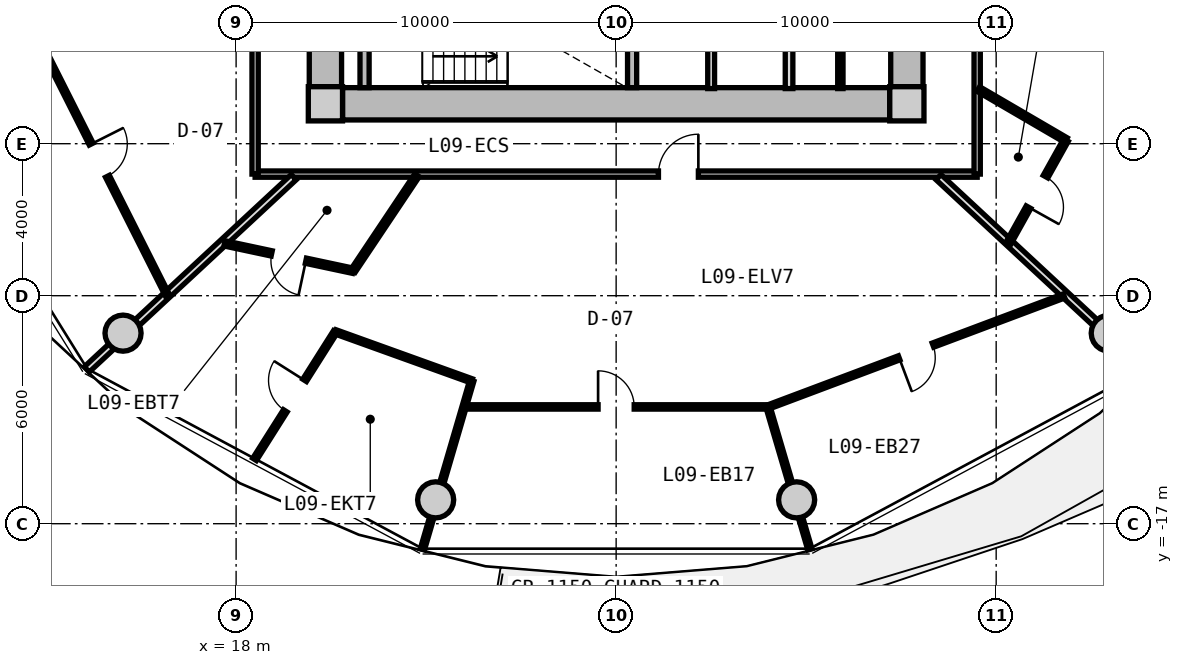
"""IFC4 building model, lengths in metres.
Left out: names, types, materials, properties, quantities, classifications, styles, units other than length and angle.
Written with IfcOpenShell. Run it as: python <this file> out.ifc"""

import sys

from ifc_helpers import new_model, si_unit, direction, frame, frame_2d, origin, origin_2d, place, context, subcontext, project, spatial, rectangle, circle, extrude, source, transform, mapped, element, fill, save


model = new_model("IFC4")
c1 = context("Model", 3, precision=1e-05, world=origin(), true_north=direction((0.0, 1.0)))
c2 = subcontext(c1, "Body", "Model", "MODEL_VIEW")
j1 = project(units=[si_unit("LENGTHUNIT", "METRE"), si_unit("PLANEANGLEUNIT", "RADIAN")], contexts=[c1])
p1 = place(None, origin())
s1 = spatial("IfcSite", under=j1, at=p1, CompositionType="ELEMENT")
p2 = place(p1, origin())
s2 = spatial("IfcBuilding", under=s1, at=p2, CompositionType="ELEMENT")
p3 = place(p2, frame((0.0, 0.0, 33.8)))
s3 = spatial("IfcBuildingStorey", under=s2, at=p3, CompositionType="ELEMENT", Elevation=33.8)
m1 = source(origin(), c2, "Body", "SweptSolid", [
    extrude(rectangle(XDim=0.9, YDim=0.9, at=origin_2d()), origin(), (0.0, 0.0, 1.0), 3.05),
])
for number, where, z_axis, x_axis in (
    (1, (20.35, -5.95, 0.0), (0.0, 0.0, 1.0), (1.0, 0.0, 0.0)),
    (2, (35.65, -5.95, 0.0), (0.0, 0.0, 1.0), (1.0, 0.0, 0.0)),
):
    element("IfcColumn", number, at=place(p3, frame(where, z_axis=z_axis, x_axis=x_axis)), inside=s3, PredefinedType="COLUMN", context=c2, shape_type="MappedRepresentation", body=[
        mapped(m1, transform((0.0, 0.0, 0.0), x_axis=(1.0, 0.0, 0.0), y_axis=(0.0, 1.0, 0.0), z_axis=(0.0, 0.0, 1.0), scale=1.0)),
    ])
m2 = source(origin(), c2, "Body", "SweptSolid", [
    extrude(rectangle(XDim=14.4, YDim=0.85, at=frame_2d((7.2, 0.0))), origin(), (0.0, 0.0, 1.0), 2.79),
])
p4 = place(p3, frame((35.2, -5.95, 0.0), z_axis=(0.0, 0.0, 1.0), x_axis=(-1.0, 0.0, 0.0)))
e3 = element("IfcWall", 3, at=p4, inside=s3, PredefinedType="SHEAR", context=c2, shape_type="MappedRepresentation", body=[
    mapped(m2, transform((0.0, 0.0, 0.0), x_axis=(1.0, 0.0, 0.0), y_axis=(0.0, 1.0, 0.0), z_axis=(0.0, 0.0, 1.0), scale=1.0)),
])
m3 = source(origin(), c2, "Body", "SweptSolid", [
    extrude(rectangle(XDim=11.0, YDim=0.85, at=frame_2d((5.5, 0.0))), origin(), (0.0, 0.0, 1.0), 2.79),
])
p5 = place(p3, frame((20.35, -5.5, 0.0), z_axis=(0.0, 0.0, 1.0), x_axis=(0.0, 1.0, 0.0)))
e4 = element("IfcWall", 4, at=p5, inside=s3, PredefinedType="SHEAR", context=c2, shape_type="MappedRepresentation", body=[
    mapped(m3, transform((0.0, 0.0, 0.0), x_axis=(1.0, 0.0, 0.0), y_axis=(0.0, 1.0, 0.0), z_axis=(0.0, 0.0, 1.0), scale=1.0)),
])
p6 = place(p5, frame((3.8, 0.0, 0.0)))
e5 = element("IfcOpeningElement", 5, at=p6, cuts=e4, PredefinedType="OPENING", context=c2, shape_type="SweptSolid", body=[
    extrude(rectangle(XDim=1.2, YDim=2.15, at=frame_2d((0.6, 1.075))), frame((0.0, 0.435, 0.0), z_axis=(0.0, -1.0, 0.0), x_axis=(1.0, 0.0, 0.0)), (0.0, 0.0, 1.0), 0.87),
])
p7 = place(p3, frame((35.65, 5.5, 0.0), z_axis=(0.0, 0.0, 1.0), x_axis=(0.0, -1.0, 0.0)))
e6 = element("IfcWall", 6, at=p7, inside=s3, PredefinedType="SHEAR", context=c2, shape_type="MappedRepresentation", body=[
    mapped(m3, transform((0.0, 0.0, 0.0), x_axis=(1.0, 0.0, 0.0), y_axis=(0.0, 1.0, 0.0), z_axis=(0.0, 0.0, 1.0), scale=1.0)),
])
p8 = place(p7, frame((5.65, 0.0, 0.0)))
e7 = element("IfcOpeningElement", 7, at=p8, cuts=e6, PredefinedType="OPENING", context=c2, shape_type="SweptSolid", body=[
    extrude(rectangle(XDim=1.2, YDim=2.15, at=frame_2d((0.6, 1.075))), frame((0.0, 0.435, 0.0), z_axis=(0.0, -1.0, 0.0), x_axis=(1.0, 0.0, 0.0)), (0.0, 0.0, 1.0), 0.87),
])
m4 = source(origin(), c2, "Body", "SweptSolid", [
    extrude(circle(Radius=0.475, at=origin_2d()), origin(), (0.0, 0.0, 1.0), 3.05),
])
for number, where, z_axis, x_axis in (
    (8, (15.025, -11.985, 0.0), (0.0, 0.0, 1.0), (1.0, 0.0, 0.0)),
    (9, (23.251, -16.373, 0.0), (0.0, 0.0, 1.0), (1.0, 0.0, 0.0)),
    (10, (32.749, -16.373, 0.0), (0.0, 0.0, 1.0), (1.0, 0.0, 0.0)),
    (11, (40.975, -11.985, 0.0), (0.0, 0.0, 1.0), (1.0, 0.0, 0.0)),
):
    element("IfcColumn", number, at=place(p3, frame(where, z_axis=z_axis, x_axis=x_axis)), inside=s3, PredefinedType="COLUMN", context=c2, shape_type="MappedRepresentation", body=[
        mapped(m4, transform((0.0, 0.0, 0.0), x_axis=(1.0, 0.0, 0.0), y_axis=(0.0, 1.0, 0.0), z_axis=(0.0, 0.0, 1.0), scale=1.0)),
    ])
m5 = source(origin(), c2, "Body", "SweptSolid", [
    extrude(rectangle(XDim=3.075, YDim=0.24, at=frame_2d((1.538, 0.0))), origin(), (0.0, 0.0, 1.0), 2.79),
])
for number, where, z_axis, x_axis in (
    (12, (21.38, -5.525, 0.0), (0.0, 0.0, 1.0), (0.0, 1.0, 0.0)),
    (13, (28.42, -5.525, 0.0), (0.0, 0.0, 1.0), (0.0, 1.0, 0.0)),
):
    element("IfcWall", number, at=place(p3, frame(where, z_axis=z_axis, x_axis=x_axis)), inside=s3, PredefinedType="PARTITIONING", context=c2, shape_type="MappedRepresentation", body=[
        mapped(m5, transform((0.0, 0.0, 0.0), x_axis=(1.0, 0.0, 0.0), y_axis=(0.0, 1.0, 0.0), z_axis=(0.0, 0.0, 1.0), scale=1.0)),
    ])
m6 = source(origin(), c2, "Body", "SweptSolid", [
    extrude(rectangle(XDim=3.8, YDim=0.2, at=frame_2d((1.9, 0.0))), origin(), (0.0, 0.0, 1.0), 2.775),
])
p9 = place(p3, frame((32.55, -5.55, 0.0), z_axis=(0.0, 0.0, 1.0), x_axis=(0.0, 1.0, 0.0)))
e14 = element("IfcWall", 14, at=p9, inside=s3, PredefinedType="PARTITIONING", context=c2, shape_type="MappedRepresentation", body=[
    mapped(m6, transform((0.0, 0.0, 0.0), x_axis=(1.0, 0.0, 0.0), y_axis=(0.0, 1.0, 0.0), z_axis=(0.0, 0.0, 1.0), scale=1.0)),
])
m7 = source(origin(), c2, "Body", "SweptSolid", [
    extrude(rectangle(XDim=3.22, YDim=0.18, at=frame_2d((1.61, 0.0))), origin(), (0.0, 0.0, 1.0), 2.775),
])
p10 = place(p3, frame((30.5, -5.55, 0.0), z_axis=(0.0, 0.0, 1.0), x_axis=(0.0, 1.0, 0.0)))
e15 = element("IfcWall", 15, at=p10, inside=s3, PredefinedType="PARTITIONING", context=c2, shape_type="MappedRepresentation", body=[
    mapped(m7, transform((0.0, 0.0, 0.0), x_axis=(1.0, 0.0, 0.0), y_axis=(0.0, 1.0, 0.0), z_axis=(0.0, 0.0, 1.0), scale=1.0)),
])
m8 = source(origin(), c2, "Body", "SweptSolid", [
    extrude(rectangle(XDim=3.8, YDim=0.14, at=frame_2d((1.9, 0.0))), origin(), (0.0, 0.0, 1.0), 2.775),
])
p11 = place(p3, frame((33.9, -5.55, 0.0), z_axis=(0.0, 0.0, 1.0), x_axis=(0.0, 1.0, 0.0)))
e16 = element("IfcWall", 16, at=p11, inside=s3, PredefinedType="PARTITIONING", context=c2, shape_type="MappedRepresentation", body=[
    mapped(m8, transform((0.0, 0.0, 0.0), x_axis=(1.0, 0.0, 0.0), y_axis=(0.0, 1.0, 0.0), z_axis=(0.0, 0.0, 1.0), scale=1.0)),
])
m9 = source(origin(), c2, "Body", "SweptSolid", [
    extrude(rectangle(XDim=19.0, YDim=0.165, at=frame_2d((9.5, 0.0))), origin(), (0.0, 0.0, 1.0), 2.775),
])
p12 = place(p3, frame((37.5, -7.8, 0.0), z_axis=(0.0, 0.0, 1.0), x_axis=(-1.0, 0.0, 0.0)))
e17 = element("IfcWall", 17, at=p12, inside=s3, PredefinedType="PARTITIONING", context=c2, shape_type="MappedRepresentation", body=[
    mapped(m9, transform((0.0, 0.0, 0.0), x_axis=(1.0, 0.0, 0.0), y_axis=(0.0, 1.0, 0.0), z_axis=(0.0, 0.0, 1.0), scale=1.0)),
])
p13 = place(p12, frame((7.336, 0.0, 0.0)))
e18 = element("IfcOpeningElement", 18, at=p13, cuts=e17, PredefinedType="OPENING", context=c2, shape_type="SweptSolid", body=[
    extrude(rectangle(XDim=1.05, YDim=2.15, at=frame_2d((0.525, 1.075))), frame((0.0, 0.093, 0.0), z_axis=(0.0, -1.0, 0.0), x_axis=(1.0, 0.0, 0.0)), (0.0, 0.0, 1.0), 0.185),
])
m10 = source(origin(), c2, "Body", "SweptSolid", [
    extrude(rectangle(XDim=15.6, YDim=0.165, at=frame_2d((7.8, 0.0))), origin(), (0.0, 0.0, 1.0), 2.775),
])
p14 = place(p3, frame((18.5, -7.8, 0.0), z_axis=(0.0, 0.0, 1.0), x_axis=(0.0, 1.0, 0.0)))
e19 = element("IfcWall", 19, at=p14, inside=s3, PredefinedType="PARTITIONING", context=c2, shape_type="MappedRepresentation", body=[
    mapped(m10, transform((0.0, 0.0, 0.0), x_axis=(1.0, 0.0, 0.0), y_axis=(0.0, 1.0, 0.0), z_axis=(0.0, 0.0, 1.0), scale=1.0)),
])
p15 = place(p14, frame((12.141, 0.0, 0.0)))
e20 = element("IfcOpeningElement", 20, at=p15, cuts=e19, PredefinedType="OPENING", context=c2, shape_type="SweptSolid", body=[
    extrude(rectangle(XDim=1.25, YDim=2.2, at=frame_2d((0.625, 1.1))), frame((0.0, 0.093, 0.0), z_axis=(0.0, -1.0, 0.0), x_axis=(1.0, 0.0, 0.0)), (0.0, 0.0, 1.0), 0.185),
])
p16 = place(p14, frame((3.63, 0.0, 0.0)))
e21 = element("IfcOpeningElement", 21, at=p16, cuts=e19, PredefinedType="OPENING", context=c2, shape_type="SweptSolid", body=[
    extrude(rectangle(XDim=1.05, YDim=2.15, at=frame_2d((0.525, 1.075))), frame((0.0, 0.093, 0.0), z_axis=(0.0, -1.0, 0.0), x_axis=(1.0, 0.0, 0.0)), (0.0, 0.0, 1.0), 0.185),
])
p17 = place(p3, frame((37.5, 7.8, 0.0), z_axis=(0.0, 0.0, 1.0), x_axis=(0.0, -1.0, 0.0)))
e22 = element("IfcWall", 22, at=p17, inside=s3, PredefinedType="PARTITIONING", context=c2, shape_type="MappedRepresentation", body=[
    mapped(m10, transform((0.0, 0.0, 0.0), x_axis=(1.0, 0.0, 0.0), y_axis=(0.0, 1.0, 0.0), z_axis=(0.0, 0.0, 1.0), scale=1.0)),
])
p18 = place(p17, frame((6.269, 0.0, 0.0)))
e23 = element("IfcOpeningElement", 23, at=p18, cuts=e22, PredefinedType="OPENING", context=c2, shape_type="SweptSolid", body=[
    extrude(rectangle(XDim=1.05, YDim=2.15, at=frame_2d((0.525, 1.075))), frame((0.0, 0.093, 0.0), z_axis=(0.0, -1.0, 0.0), x_axis=(1.0, 0.0, 0.0)), (0.0, 0.0, 1.0), 0.185),
])
m11 = source(origin(), c2, "Body", "SweptSolid", [
    extrude(rectangle(XDim=7.435, YDim=0.19, at=frame_2d((3.717, 0.0))), origin(), (0.0, 0.0, 1.0), 2.225),
])
p19 = place(p3, frame((19.517, -7.88, 0.0), z_axis=(0.0, 0.0, 1.0), x_axis=(-0.732651956848, -0.680603489652, 0.0)))
e24 = element("IfcWall", 24, at=p19, inside=s3, PredefinedType="PARTITIONING", context=c2, shape_type="MappedRepresentation", body=[
    mapped(m11, transform((0.0, 0.0, 0.0), x_axis=(1.0, 0.0, 0.0), y_axis=(0.0, 1.0, 0.0), z_axis=(0.0, 0.0, 1.0), scale=1.0)),
])
m12 = source(origin(), c2, "Body", "SweptSolid", [
    extrude(rectangle(XDim=8.018, YDim=0.115, at=frame_2d((4.009, 0.0))), origin(), (0.0, 0.0, 1.0), 2.775),
])
p20 = place(p3, frame((12.596, -3.854, 0.0), z_axis=(0.0, 0.0, 1.0), x_axis=(0.450134355233, -0.89296084026, 0.0)))
e25 = element("IfcWall", 25, at=p20, inside=s3, PredefinedType="PARTITIONING", context=c2, shape_type="MappedRepresentation", body=[
    mapped(m12, transform((0.0, 0.0, 0.0), x_axis=(1.0, 0.0, 0.0), y_axis=(0.0, 1.0, 0.0), z_axis=(0.0, 0.0, 1.0), scale=1.0)),
])
p21 = place(p20, frame((3.534, 0.0, 0.0)))
e26 = element("IfcOpeningElement", 26, at=p21, cuts=e25, PredefinedType="OPENING", context=c2, shape_type="SweptSolid", body=[
    extrude(rectangle(XDim=0.95, YDim=2.1, at=frame_2d((0.475, 1.05))), frame((0.0, 0.067, 0.0), z_axis=(0.0, -1.0, 0.0), x_axis=(1.0, 0.0, 0.0)), (0.0, 0.0, 1.0), 0.135),
])
m13 = source(origin(), c2, "Body", "SweptSolid", [
    extrude(rectangle(XDim=4.414, YDim=0.115, at=frame_2d((2.207, 0.0))), origin(), (0.0, 0.0, 1.0), 2.225),
])
p22 = place(p3, frame((13.259, -3.688, 0.0), z_axis=(0.0, 0.0, 1.0), x_axis=(-0.971401274504, -0.237443812073, 0.0)))
e27 = element("IfcWall", 27, at=p22, inside=s3, PredefinedType="PARTITIONING", context=c2, shape_type="MappedRepresentation", body=[
    mapped(m13, transform((0.0, 0.0, 0.0), x_axis=(1.0, 0.0, 0.0), y_axis=(0.0, 1.0, 0.0), z_axis=(0.0, 0.0, 1.0), scale=1.0)),
])
p23 = place(p3, frame((36.483, -7.88, 0.0), z_axis=(0.0, 0.0, 1.0), x_axis=(0.732651956848, -0.680603489652, 0.0)))
e28 = element("IfcWall", 28, at=p23, inside=s3, PredefinedType="PARTITIONING", context=c2, shape_type="MappedRepresentation", body=[
    mapped(m11, transform((0.0, 0.0, 0.0), x_axis=(1.0, 0.0, 0.0), y_axis=(0.0, 1.0, 0.0), z_axis=(0.0, 0.0, 1.0), scale=1.0)),
])
m14 = source(origin(), c2, "Body", "SweptSolid", [
    extrude(rectangle(XDim=7.993, YDim=0.115, at=frame_2d((3.996, 0.0))), origin(), (0.0, 0.0, 1.0), 2.775),
])
p24 = place(p3, frame((24.004, -13.927, 0.0), z_axis=(0.0, 0.0, 1.0), x_axis=(1.0, 0.0, 0.0)))
e29 = element("IfcWall", 29, at=p24, inside=s3, PredefinedType="PARTITIONING", context=c2, shape_type="MappedRepresentation", body=[
    mapped(m14, transform((0.0, 0.0, 0.0), x_axis=(1.0, 0.0, 0.0), y_axis=(0.0, 1.0, 0.0), z_axis=(0.0, 0.0, 1.0), scale=1.0)),
])
p25 = place(p24, frame((3.521, 0.0, 0.0)))
e30 = element("IfcOpeningElement", 30, at=p25, cuts=e29, PredefinedType="OPENING", context=c2, shape_type="SweptSolid", body=[
    extrude(rectangle(XDim=0.95, YDim=2.1, at=frame_2d((0.475, 1.05))), frame((0.0, 0.067, 0.0), z_axis=(0.0, -1.0, 0.0), x_axis=(1.0, 0.0, 0.0)), (0.0, 0.0, 1.0), 0.135),
])
m15 = source(origin(), c2, "Body", "SweptSolid", [
    extrude(rectangle(XDim=4.625, YDim=0.115, at=frame_2d((2.312, 0.0))), origin(), (0.0, 0.0, 1.0), 2.225),
])
p26 = place(p3, frame((24.201, -13.239, 0.0), z_axis=(0.0, 0.0, 1.0), x_axis=(-0.2810742844, -0.959686014616, 0.0)))
e31 = element("IfcWall", 31, at=p26, inside=s3, PredefinedType="PARTITIONING", context=c2, shape_type="MappedRepresentation", body=[
    mapped(m15, transform((0.0, 0.0, 0.0), x_axis=(1.0, 0.0, 0.0), y_axis=(0.0, 1.0, 0.0), z_axis=(0.0, 0.0, 1.0), scale=1.0)),
])
m16 = source(origin(), c2, "Body", "SweptSolid", [
    extrude(rectangle(XDim=8.32, YDim=0.115, at=frame_2d((4.16, 0.0))), origin(), (0.0, 0.0, 1.0), 2.775),
])
p27 = place(p3, frame((31.997, -13.93, 0.0), z_axis=(0.0, 0.0, 1.0), x_axis=(0.936180763098, 0.351518959382, 0.0)))
e32 = element("IfcWall", 32, at=p27, inside=s3, PredefinedType="PARTITIONING", context=c2, shape_type="MappedRepresentation", body=[
    mapped(m16, transform((0.0, 0.0, 0.0), x_axis=(1.0, 0.0, 0.0), y_axis=(0.0, 1.0, 0.0), z_axis=(0.0, 0.0, 1.0), scale=1.0)),
])
p28 = place(p27, frame((3.685, 0.0, 0.0)))
e33 = element("IfcOpeningElement", 33, at=p28, cuts=e32, PredefinedType="OPENING", context=c2, shape_type="SweptSolid", body=[
    extrude(rectangle(XDim=0.95, YDim=2.1, at=frame_2d((0.475, 1.05))), frame((0.0, 0.067, 0.0), z_axis=(0.0, -1.0, 0.0), x_axis=(1.0, 0.0, 0.0)), (0.0, 0.0, 1.0), 0.135),
])
m17 = source(origin(), c2, "Body", "SweptSolid", [
    extrude(rectangle(XDim=3.905, YDim=0.115, at=frame_2d((1.952, 0.0))), origin(), (0.0, 0.0, 1.0), 2.225),
])
p29 = place(p3, frame((31.997, -13.93, 0.0), z_axis=(0.0, 0.0, 1.0), x_axis=(0.282037692958, -0.959403324859, 0.0)))
e34 = element("IfcWall", 34, at=p29, inside=s3, PredefinedType="PARTITIONING", context=c2, shape_type="MappedRepresentation", body=[
    mapped(m17, transform((0.0, 0.0, 0.0), x_axis=(1.0, 0.0, 0.0), y_axis=(0.0, 1.0, 0.0), z_axis=(0.0, 0.0, 1.0), scale=1.0)),
])
m18 = source(origin(), c2, "Body", "SweptSolid", [
    extrude(rectangle(XDim=3.025, YDim=0.14, at=frame_2d((1.513, 0.0))), origin(), (0.0, 0.0, 1.0), 2.775),
])
p30 = place(p3, frame((22.76, -7.83, 0.0), z_axis=(0.0, 0.0, 1.0), x_axis=(-0.556189165904, -0.831055721195, 0.0)))
e35 = element("IfcWall", 35, at=p30, inside=s3, PredefinedType="PARTITIONING", context=c2, shape_type="MappedRepresentation", body=[
    mapped(m18, transform((0.0, 0.0, 0.0), x_axis=(1.0, 0.0, 0.0), y_axis=(0.0, 1.0, 0.0), z_axis=(0.0, 0.0, 1.0), scale=1.0)),
])
m19 = source(origin(), c2, "Body", "SweptSolid", [
    extrude(rectangle(XDim=3.459, YDim=0.14, at=frame_2d((1.729, 0.0))), origin(), (0.0, 0.0, 1.0), 2.775),
])
p31 = place(p3, frame((21.078, -10.344, 0.0), z_axis=(0.0, 0.0, 1.0), x_axis=(-0.978006468578, 0.208574560815, 0.0)))
e36 = element("IfcWall", 36, at=p31, inside=s3, PredefinedType="PARTITIONING", context=c2, shape_type="MappedRepresentation", body=[
    mapped(m19, transform((0.0, 0.0, 0.0), x_axis=(1.0, 0.0, 0.0), y_axis=(0.0, 1.0, 0.0), z_axis=(0.0, 0.0, 1.0), scale=1.0)),
])
p32 = place(p31, frame((1.27, 0.0, 0.0)))
e37 = element("IfcOpeningElement", 37, at=p32, cuts=e36, PredefinedType="OPENING", context=c2, shape_type="SweptSolid", body=[
    extrude(rectangle(XDim=0.92, YDim=2.1, at=frame_2d((0.46, 1.05))), frame((0.0, 0.08, 0.0), z_axis=(0.0, -1.0, 0.0), x_axis=(1.0, 0.0, 0.0)), (0.0, 0.0, 1.0), 0.16),
])
m20 = source(origin(), c2, "Body", "SweptSolid", [
    extrude(rectangle(XDim=3.974, YDim=0.115, at=frame_2d((1.987, 0.0))), origin(), (0.0, 0.0, 1.0), 2.775),
])
p33 = place(p3, frame((20.611, -11.95, 0.0), z_axis=(0.0, 0.0, 1.0), x_axis=(-0.534810918023, -0.844971764003, 0.0)))
e38 = element("IfcWall", 38, at=p33, inside=s3, PredefinedType="PARTITIONING", context=c2, shape_type="MappedRepresentation", body=[
    mapped(m20, transform((0.0, 0.0, 0.0), x_axis=(1.0, 0.0, 0.0), y_axis=(0.0, 1.0, 0.0), z_axis=(0.0, 0.0, 1.0), scale=1.0)),
])
p34 = place(p33, frame((1.512, 0.0, 0.0)))
e39 = element("IfcOpeningElement", 39, at=p34, cuts=e38, PredefinedType="OPENING", context=c2, shape_type="SweptSolid", body=[
    extrude(rectangle(XDim=0.95, YDim=2.1, at=frame_2d((0.475, 1.05))), frame((0.0, 0.067, 0.0), z_axis=(0.0, -1.0, 0.0), x_axis=(1.0, 0.0, 0.0)), (0.0, 0.0, 1.0), 0.135),
])
m21 = source(origin(), c2, "Body", "SweptSolid", [
    extrude(rectangle(XDim=3.814, YDim=0.115, at=frame_2d((1.907, 0.0))), origin(), (0.0, 0.0, 1.0), 2.775),
])
p35 = place(p3, frame((20.611, -11.95, 0.0), z_axis=(0.0, 0.0, 1.0), x_axis=(0.940935542004, -0.338585743637, 0.0)))
e40 = element("IfcWall", 40, at=p35, inside=s3, PredefinedType="PARTITIONING", context=c2, shape_type="MappedRepresentation", body=[
    mapped(m21, transform((0.0, 0.0, 0.0), x_axis=(1.0, 0.0, 0.0), y_axis=(0.0, 1.0, 0.0), z_axis=(0.0, 0.0, 1.0), scale=1.0)),
])
m22 = source(origin(), c2, "Body", "SweptSolid", [
    extrude(rectangle(XDim=2.669, YDim=0.14, at=frame_2d((1.335, 0.0))), origin(), (0.0, 0.0, 1.0), 2.775),
])
p36 = place(p3, frame((37.53, -5.561, 0.0), z_axis=(0.0, 0.0, 1.0), x_axis=(0.86369928178, -0.50400749067, 0.0)))
e41 = element("IfcWall", 41, at=p36, inside=s3, PredefinedType="PARTITIONING", context=c2, shape_type="MappedRepresentation", body=[
    mapped(m22, transform((0.0, 0.0, 0.0), x_axis=(1.0, 0.0, 0.0), y_axis=(0.0, 1.0, 0.0), z_axis=(0.0, 0.0, 1.0), scale=1.0)),
])
m23 = source(origin(), c2, "Body", "SweptSolid", [
    extrude(rectangle(XDim=3.121, YDim=0.14, at=frame_2d((1.561, 0.0))), origin(), (0.0, 0.0, 1.0), 2.775),
])
p37 = place(p3, frame((39.836, -6.906, 0.0), z_axis=(0.0, 0.0, 1.0), x_axis=(-0.487302357327, -0.873233309342, 0.0)))
e42 = element("IfcWall", 42, at=p37, inside=s3, PredefinedType="PARTITIONING", context=c2, shape_type="MappedRepresentation", body=[
    mapped(m23, transform((0.0, 0.0, 0.0), x_axis=(1.0, 0.0, 0.0), y_axis=(0.0, 1.0, 0.0), z_axis=(0.0, 0.0, 1.0), scale=1.0)),
])
p38 = place(p37, frame((1.101, 0.0, 0.0)))
e43 = element("IfcOpeningElement", 43, at=p38, cuts=e42, PredefinedType="OPENING", context=c2, shape_type="SweptSolid", body=[
    extrude(rectangle(XDim=0.92, YDim=2.1, at=frame_2d((0.46, 1.05))), frame((0.0, 0.08, 0.0), z_axis=(0.0, -1.0, 0.0), x_axis=(1.0, 0.0, 0.0)), (0.0, 0.0, 1.0), 0.16),
])
m24 = source(origin(), c2, "Body", "SweptSolid", [
    extrude(rectangle(XDim=0.95, YDim=2.1, at=frame_2d((0.475, 1.05))), frame((0.0, 0.025, 0.0), z_axis=(0.0, -1.0, 0.0), x_axis=(1.0, 0.0, 0.0)), (0.0, 0.0, 1.0), 0.05),
])
p39 = place(p21, origin())
e44 = element("IfcDoor", 44, at=p39, inside=s3, OperationType="SINGLE_SWING_LEFT", PredefinedType="DOOR", context=c2, shape_type="MappedRepresentation", body=[
    mapped(m24, transform((0.0, 0.0, 0.0), x_axis=(1.0, 0.0, 0.0), y_axis=(0.0, 1.0, 0.0), z_axis=(0.0, 0.0, 1.0), scale=1.0)),
])
fill(e26, e44)
m25 = source(origin(), c2, "Body", "SweptSolid", [
    extrude(rectangle(XDim=1.05, YDim=2.15, at=frame_2d((0.525, 1.075))), frame((0.0, 0.025, 0.0), z_axis=(0.0, -1.0, 0.0), x_axis=(1.0, 0.0, 0.0)), (0.0, 0.0, 1.0), 0.05),
])
p40 = place(p13, frame((1.05, 0.0, 0.0), z_axis=(0.0, 0.0, 1.0), x_axis=(-1.0, 0.0, 0.0)))
e45 = element("IfcDoor", 45, at=p40, inside=s3, OperationType="SINGLE_SWING_RIGHT", PredefinedType="DOOR", context=c2, shape_type="MappedRepresentation", body=[
    mapped(m25, transform((0.0, 0.0, 0.0), x_axis=(1.0, 0.0, 0.0), y_axis=(0.0, 1.0, 0.0), z_axis=(0.0, 0.0, 1.0), scale=1.0)),
])
fill(e18, e45)
m26 = source(origin(), c2, "Body", "SweptSolid", [
    extrude(rectangle(XDim=0.92, YDim=2.1, at=frame_2d((0.46, 1.05))), frame((0.0, 0.025, 0.0), z_axis=(0.0, -1.0, 0.0), x_axis=(1.0, 0.0, 0.0)), (0.0, 0.0, 1.0), 0.05),
])
p41 = place(p32, origin())
e46 = element("IfcDoor", 46, at=p41, inside=s3, OperationType="SINGLE_SWING_LEFT", PredefinedType="DOOR", context=c2, shape_type="MappedRepresentation", body=[
    mapped(m26, transform((0.0, 0.0, 0.0), x_axis=(1.0, 0.0, 0.0), y_axis=(0.0, 1.0, 0.0), z_axis=(0.0, 0.0, 1.0), scale=1.0)),
])
fill(e37, e46)
p42 = place(p34, frame((0.95, 0.0, 0.0), z_axis=(0.0, 0.0, 1.0), x_axis=(-1.0, 0.0, 0.0)))
e47 = element("IfcDoor", 47, at=p42, inside=s3, OperationType="SINGLE_SWING_RIGHT", PredefinedType="DOOR", context=c2, shape_type="MappedRepresentation", body=[
    mapped(m24, transform((0.0, 0.0, 0.0), x_axis=(1.0, 0.0, 0.0), y_axis=(0.0, 1.0, 0.0), z_axis=(0.0, 0.0, 1.0), scale=1.0)),
])
fill(e39, e47)
p43 = place(p25, origin())
e48 = element("IfcDoor", 48, at=p43, inside=s3, OperationType="SINGLE_SWING_LEFT", PredefinedType="DOOR", context=c2, shape_type="MappedRepresentation", body=[
    mapped(m24, transform((0.0, 0.0, 0.0), x_axis=(1.0, 0.0, 0.0), y_axis=(0.0, 1.0, 0.0), z_axis=(0.0, 0.0, 1.0), scale=1.0)),
])
fill(e30, e48)
p44 = place(p28, frame((0.95, 0.0, 0.0), z_axis=(0.0, 0.0, 1.0), x_axis=(-1.0, 0.0, 0.0)))
e49 = element("IfcDoor", 49, at=p44, inside=s3, OperationType="SINGLE_SWING_RIGHT", PredefinedType="DOOR", context=c2, shape_type="MappedRepresentation", body=[
    mapped(m24, transform((0.0, 0.0, 0.0), x_axis=(1.0, 0.0, 0.0), y_axis=(0.0, 1.0, 0.0), z_axis=(0.0, 0.0, 1.0), scale=1.0)),
])
fill(e33, e49)
p45 = place(p38, origin())
e50 = element("IfcDoor", 50, at=p45, inside=s3, OperationType="SINGLE_SWING_RIGHT", PredefinedType="DOOR", context=c2, shape_type="MappedRepresentation", body=[
    mapped(m26, transform((0.0, 0.0, 0.0), x_axis=(1.0, 0.0, 0.0), y_axis=(0.0, 1.0, 0.0), z_axis=(0.0, 0.0, 1.0), scale=1.0)),
])
fill(e43, e50)
save(model, sys.argv[1])
